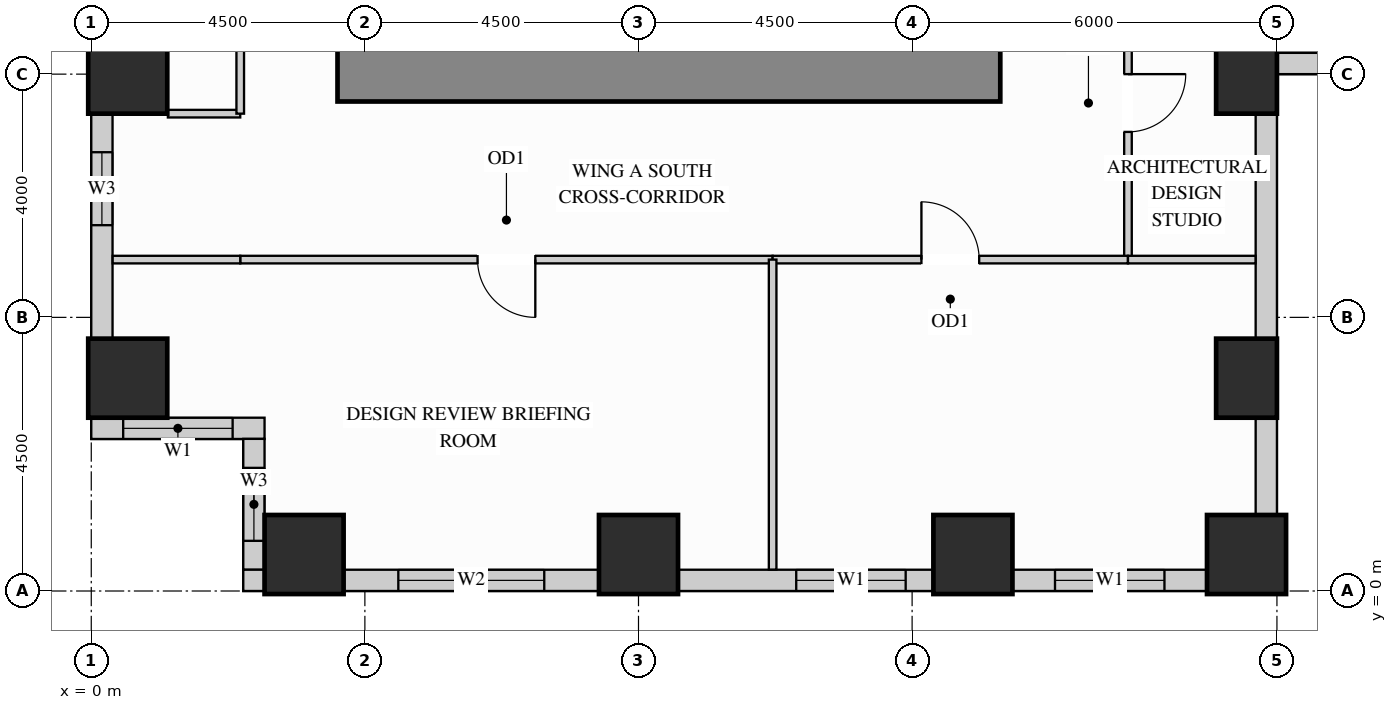
"""IFC4 building model, lengths in metres.
Left out: names, types, materials, properties, quantities, classifications, styles, units other than length and angle.
Written with IfcOpenShell. Run it as: python <this file> out.ifc"""

import sys

from ifc_helpers import new_model, si_unit, direction, frame, frame_2d, origin, origin_2d, place, context, subcontext, project, spatial, rectangle, extrude, source, transform, mapped, element, fill, save


model = new_model("IFC4")
c1 = context("Model", 3, precision=1e-05, world=origin(), true_north=direction((0.0, 1.0)))
c2 = subcontext(c1, "Body", "Model", "MODEL_VIEW")
j1 = project(units=[si_unit("LENGTHUNIT", "METRE"), si_unit("PLANEANGLEUNIT", "RADIAN")], contexts=[c1])
p1 = place(None, origin())
s1 = spatial("IfcSite", under=j1, at=p1, CompositionType="ELEMENT")
p2 = place(p1, origin())
s2 = spatial("IfcBuilding", under=s1, at=p2, CompositionType="ELEMENT")
p3 = place(p2, frame((0.0, 0.0, 47.7)))
s3 = spatial("IfcBuildingStorey", under=s2, at=p3, CompositionType="ELEMENT", Elevation=47.7)
m1 = source(origin(), c2, "Body", "SweptSolid", [
    extrude(rectangle(XDim=1.0, YDim=1.3, at=origin_2d()), origin(), (0.0, 0.0, 1.0), 3.38),
])
for number, where, z_axis, x_axis in (
    (1, (19.0, 3.5, 0.0), (0.0, 0.0, 1.0), (1.0, 0.0, 0.0)),
    (2, (19.0, 8.5, 0.0), (0.0, 0.0, 1.0), (1.0, 0.0, 0.0)),
):
    element("IfcColumn", number, at=place(p3, frame(where, z_axis=z_axis, x_axis=x_axis)), inside=s3, PredefinedType="COLUMN", context=c2, shape_type="MappedRepresentation", body=[
        mapped(m1, transform((0.0, 0.0, 0.0), x_axis=(1.0, 0.0, 0.0), y_axis=(0.0, 1.0, 0.0), z_axis=(0.0, 0.0, 1.0))),
    ])
m2 = source(origin(), c2, "Body", "SweptSolid", [
    extrude(rectangle(XDim=1.3, YDim=1.3, at=origin_2d()), origin(), (0.0, 0.0, 1.0), 3.38),
])
for number, where, z_axis, x_axis in (
    (3, (14.5, 0.6, 0.0), (0.0, 0.0, 1.0), (1.0, 0.0, 0.0)),
    (4, (19.0, 0.6, 0.0), (0.0, 0.0, 1.0), (1.0, 0.0, 0.0)),
    (5, (3.5, 0.6, 0.0), (0.0, 0.0, 1.0), (1.0, 0.0, 0.0)),
    (6, (9.0, 0.6, 0.0), (0.0, 0.0, 1.0), (1.0, 0.0, 0.0)),
    (7, (0.6, 3.5, 0.0), (0.0, 0.0, 1.0), (1.0, 0.0, 0.0)),
    (8, (0.6, 8.5, 0.0), (0.0, 0.0, 1.0), (1.0, 0.0, 0.0)),
):
    element("IfcColumn", number, at=place(p3, frame(where, z_axis=z_axis, x_axis=x_axis)), inside=s3, PredefinedType="COLUMN", context=c2, shape_type="MappedRepresentation", body=[
        mapped(m2, transform((0.0, 0.0, 0.0), x_axis=(1.0, 0.0, 0.0), y_axis=(0.0, 1.0, 0.0), z_axis=(0.0, 0.0, 1.0))),
    ])
m3 = source(origin(), c2, "Body", "SweptSolid", [
    extrude(rectangle(XDim=10.9, YDim=0.9, at=frame_2d((5.45, 0.0))), origin(), (0.0, 0.0, 1.0), 3.38),
])
p4 = place(p3, frame((4.05, 8.5, 0.0), z_axis=(0.0, 0.0, 1.0), x_axis=(1.0, 0.0, 0.0)))
e9 = element("IfcWall", 9, at=p4, inside=s3, PredefinedType="SHEAR", context=c2, shape_type="MappedRepresentation", body=[
    mapped(m3, transform((0.0, 0.0, 0.0), x_axis=(1.0, 0.0, 0.0), y_axis=(0.0, 1.0, 0.0), z_axis=(0.0, 0.0, 1.0))),
])
p5 = place(p3, frame((0.175, 7.852, 0.0), z_axis=(0.0, 0.0, 1.0), x_axis=(0.0, -1.0, 0.0)))
e10 = element("IfcWall", 10, at=p5, inside=s3, PredefinedType="SOLIDWALL", context=c2, shape_type="SweptSolid", body=[
    extrude(rectangle(XDim=3.704, YDim=0.35, at=frame_2d((1.852, 0.0))), origin(), (0.0, 0.0, 1.0), 2.51),
])
p6 = place(p5, frame((0.636, 0.0, 0.78)))
e11 = element("IfcOpeningElement", 11, at=p6, cuts=e10, PredefinedType="OPENING", context=c2, shape_type="SweptSolid", body=[
    extrude(rectangle(XDim=1.2, YDim=1.55, at=frame_2d((0.6, 0.775))), frame((0.0, 0.185, 0.0), z_axis=(0.0, -1.0, 0.0), x_axis=(1.0, 0.0, 0.0)), (0.0, 0.0, 1.0), 0.37),
])
p7 = place(p3, frame((0.0, 2.675, 0.0), z_axis=(0.0, 0.0, 1.0), x_axis=(1.0, 0.0, 0.0)))
e12 = element("IfcWall", 12, at=p7, inside=s3, PredefinedType="SOLIDWALL", context=c2, shape_type="SweptSolid", body=[
    extrude(rectangle(XDim=2.85, YDim=0.35, at=frame_2d((1.425, 0.0))), origin(), (0.0, 0.0, 1.0), 3.365),
])
p8 = place(p7, frame((0.525, 0.0, 0.78)))
e13 = element("IfcOpeningElement", 13, at=p8, cuts=e12, PredefinedType="OPENING", context=c2, shape_type="SweptSolid", body=[
    extrude(rectangle(XDim=1.8, YDim=2.1, at=frame_2d((0.9, 1.05))), frame((0.0, 0.185, 0.0), z_axis=(0.0, -1.0, 0.0), x_axis=(1.0, 0.0, 0.0)), (0.0, 0.0, 1.0), 0.37),
])
p9 = place(p3, frame((2.675, 2.502, 0.0), z_axis=(0.0, 0.0, 1.0), x_axis=(0.0, -1.0, 0.0)))
e14 = element("IfcWall", 14, at=p9, inside=s3, PredefinedType="SOLIDWALL", context=c2, shape_type="SweptSolid", body=[
    extrude(rectangle(XDim=2.154, YDim=0.35, at=frame_2d((1.077, 0.0))), origin(), (0.0, 0.0, 1.0), 3.365),
])
p10 = place(p9, frame((0.477, 0.0, 0.78)))
e15 = element("IfcOpeningElement", 15, at=p10, cuts=e14, PredefinedType="OPENING", context=c2, shape_type="SweptSolid", body=[
    extrude(rectangle(XDim=1.2, YDim=2.1, at=frame_2d((0.6, 1.05))), frame((0.0, 0.185, 0.0), z_axis=(0.0, -1.0, 0.0), x_axis=(1.0, 0.0, 0.0)), (0.0, 0.0, 1.0), 0.37),
])
m4 = source(origin(), c2, "Body", "SweptSolid", [
    extrude(rectangle(XDim=0.352, YDim=0.35, at=frame_2d((0.176, 0.0))), origin(), (0.0, 0.0, 1.0), 3.365),
])
p11 = place(p3, frame((2.5, 0.175, 0.0), z_axis=(0.0, 0.0, 1.0), x_axis=(1.0, 0.0, 0.0)))
e16 = element("IfcWall", 16, at=p11, inside=s3, PredefinedType="SOLIDWALL", context=c2, shape_type="MappedRepresentation", body=[
    mapped(m4, transform((0.0, 0.0, 0.0), x_axis=(1.0, 0.0, 0.0), y_axis=(0.0, 1.0, 0.0), z_axis=(0.0, 0.0, 1.0))),
])
p12 = place(p3, frame((4.148, 0.175, 0.0), z_axis=(0.0, 0.0, 1.0), x_axis=(1.0, 0.0, 0.0)))
e17 = element("IfcWall", 17, at=p12, inside=s3, PredefinedType="SOLIDWALL", context=c2, shape_type="SweptSolid", body=[
    extrude(rectangle(XDim=4.204, YDim=0.35, at=frame_2d((2.102, 0.0))), origin(), (0.0, 0.0, 1.0), 2.51),
])
p13 = place(p12, frame((0.902, 0.0, 0.78)))
e18 = element("IfcOpeningElement", 18, at=p13, cuts=e17, PredefinedType="OPENING", context=c2, shape_type="SweptSolid", body=[
    extrude(rectangle(XDim=2.4, YDim=1.55, at=frame_2d((1.2, 0.775))), frame((0.0, 0.185, 0.0), z_axis=(0.0, -1.0, 0.0), x_axis=(1.0, 0.0, 0.0)), (0.0, 0.0, 1.0), 0.37),
])
p14 = place(p3, frame((9.648, 0.175, 0.0), z_axis=(0.0, 0.0, 1.0), x_axis=(1.0, 0.0, 0.0)))
e19 = element("IfcWall", 19, at=p14, inside=s3, PredefinedType="SOLIDWALL", context=c2, shape_type="SweptSolid", body=[
    extrude(rectangle(XDim=4.204, YDim=0.35, at=frame_2d((2.102, 0.0))), origin(), (0.0, 0.0, 1.0), 2.51),
])
p15 = place(p14, frame((1.946, 0.0, 0.78)))
e20 = element("IfcOpeningElement", 20, at=p15, cuts=e19, PredefinedType="OPENING", context=c2, shape_type="SweptSolid", body=[
    extrude(rectangle(XDim=1.8, YDim=1.55, at=frame_2d((0.9, 0.775))), frame((0.0, 0.185, 0.0), z_axis=(0.0, -1.0, 0.0), x_axis=(1.0, 0.0, 0.0)), (0.0, 0.0, 1.0), 0.37),
])
p16 = place(p3, frame((15.148, 0.175, 0.0), z_axis=(0.0, 0.0, 1.0), x_axis=(1.0, 0.0, 0.0)))
e21 = element("IfcWall", 21, at=p16, inside=s3, PredefinedType="SOLIDWALL", context=c2, shape_type="SweptSolid", body=[
    extrude(rectangle(XDim=3.204, YDim=0.35, at=frame_2d((1.602, 0.0))), origin(), (0.0, 0.0, 1.0), 2.51),
])
p17 = place(p16, frame((0.702, 0.0, 0.78)))
e22 = element("IfcOpeningElement", 22, at=p17, cuts=e21, PredefinedType="OPENING", context=c2, shape_type="SweptSolid", body=[
    extrude(rectangle(XDim=1.8, YDim=1.55, at=frame_2d((0.9, 0.775))), frame((0.0, 0.185, 0.0), z_axis=(0.0, -1.0, 0.0), x_axis=(1.0, 0.0, 0.0)), (0.0, 0.0, 1.0), 0.37),
])
m5 = source(origin(), c2, "Body", "SweptSolid", [
    extrude(rectangle(XDim=1.604, YDim=0.35, at=frame_2d((0.802, 0.0))), origin(), (0.0, 0.0, 1.0), 2.51),
])
p18 = place(p3, frame((19.325, 1.248, 0.0), z_axis=(0.0, 0.0, 1.0), x_axis=(0.0, 1.0, 0.0)))
e23 = element("IfcWall", 23, at=p18, inside=s3, PredefinedType="SOLIDWALL", context=c2, shape_type="MappedRepresentation", body=[
    mapped(m5, transform((0.0, 0.0, 0.0), x_axis=(1.0, 0.0, 0.0), y_axis=(0.0, 1.0, 0.0), z_axis=(0.0, 0.0, 1.0))),
])
m6 = source(origin(), c2, "Body", "SweptSolid", [
    extrude(rectangle(XDim=3.704, YDim=0.35, at=frame_2d((1.852, 0.0))), origin(), (0.0, 0.0, 1.0), 2.51),
])
p19 = place(p3, frame((19.325, 4.148, 0.0), z_axis=(0.0, 0.0, 1.0), x_axis=(0.0, 1.0, 0.0)))
e24 = element("IfcWall", 24, at=p19, inside=s3, PredefinedType="SOLIDWALL", context=c2, shape_type="MappedRepresentation", body=[
    mapped(m6, transform((0.0, 0.0, 0.0), x_axis=(1.0, 0.0, 0.0), y_axis=(0.0, 1.0, 0.0), z_axis=(0.0, 0.0, 1.0))),
])
p20 = place(p3, frame((19.498, 8.675, 0.0), z_axis=(0.0, 0.0, 1.0), x_axis=(1.0, 0.0, 0.0)))
e25 = element("IfcWall", 25, at=p20, inside=s3, PredefinedType="SOLIDWALL", context=c2, shape_type="SweptSolid", body=[
    extrude(rectangle(XDim=3.404, YDim=0.35, at=frame_2d((1.702, 0.0))), origin(), (0.0, 0.0, 1.0), 3.365),
])
p21 = place(p20, frame((0.952, 0.0, 0.78)))
e26 = element("IfcOpeningElement", 26, at=p21, cuts=e25, PredefinedType="OPENING", context=c2, shape_type="SweptSolid", body=[
    extrude(rectangle(XDim=1.5, YDim=2.0, at=frame_2d((0.75, 1.0))), frame((0.0, 0.185, 0.0), z_axis=(0.0, -1.0, 0.0), x_axis=(1.0, 0.0, 0.0)), (0.0, 0.0, 1.0), 0.37),
])
p22 = place(p3, frame((17.05, 5.45, 0.0), z_axis=(0.0, 0.0, 1.0), x_axis=(0.0, 1.0, 0.0)))
e27 = element("IfcWall", 27, at=p22, inside=s3, PredefinedType="PARTITIONING", context=c2, shape_type="SweptSolid", body=[
    extrude(rectangle(XDim=5.15, YDim=0.125, at=frame_2d((2.575, 0.0))), origin(), (0.0, 0.0, 1.0), 3.365),
])
p23 = place(p22, frame((2.1, 0.0, 0.0)))
e28 = element("IfcOpeningElement", 28, at=p23, cuts=e27, PredefinedType="OPENING", context=c2, shape_type="SweptSolid", body=[
    extrude(rectangle(XDim=0.95, YDim=2.15, at=frame_2d((0.475, 1.075))), frame((0.0, 0.073, 0.0), z_axis=(0.0, -1.0, 0.0), x_axis=(1.0, 0.0, 0.0)), (0.0, 0.0, 1.0), 0.145),
])
m7 = source(origin(), c2, "Body", "SweptSolid", [
    extrude(rectangle(XDim=1.19, YDim=0.125, at=frame_2d((0.595, 0.0))), origin(), (0.0, 0.0, 1.0), 3.365),
])
p24 = place(p3, frame((1.26, 7.85, 0.0), z_axis=(0.0, 0.0, 1.0), x_axis=(1.0, 0.0, 0.0)))
e29 = element("IfcWall", 29, at=p24, inside=s3, PredefinedType="PARTITIONING", context=c2, shape_type="MappedRepresentation", body=[
    mapped(m7, transform((0.0, 0.0, 0.0), x_axis=(1.0, 0.0, 0.0), y_axis=(0.0, 1.0, 0.0), z_axis=(0.0, 0.0, 1.0))),
])
p25 = place(p3, frame((2.45, 5.45, 0.0), z_axis=(0.0, 0.0, 1.0), x_axis=(1.0, 0.0, 0.0)))
e30 = element("IfcWall", 30, at=p25, inside=s3, PredefinedType="PARTITIONING", context=c2, shape_type="SweptSolid", body=[
    extrude(rectangle(XDim=8.756, YDim=0.125, at=frame_2d((4.378, 0.0))), origin(), (0.0, 0.0, 1.0), 3.365),
])
p26 = place(p25, frame((3.903, 0.0, 0.0)))
e31 = element("IfcOpeningElement", 31, at=p26, cuts=e30, PredefinedType="OPENING", context=c2, shape_type="SweptSolid", body=[
    extrude(rectangle(XDim=0.95, YDim=2.15, at=frame_2d((0.475, 1.075))), frame((0.0, 0.073, 0.0), z_axis=(0.0, -1.0, 0.0), x_axis=(1.0, 0.0, 0.0)), (0.0, 0.0, 1.0), 0.145),
])
p27 = place(p3, frame((11.206, 5.45, 0.0), z_axis=(0.0, 0.0, 1.0), x_axis=(1.0, 0.0, 0.0)))
e32 = element("IfcWall", 32, at=p27, inside=s3, PredefinedType="PARTITIONING", context=c2, shape_type="SweptSolid", body=[
    extrude(rectangle(XDim=5.844, YDim=0.125, at=frame_2d((2.922, 0.0))), origin(), (0.0, 0.0, 1.0), 3.365),
])
p28 = place(p27, frame((2.447, 0.0, 0.0)))
e33 = element("IfcOpeningElement", 33, at=p28, cuts=e32, PredefinedType="OPENING", context=c2, shape_type="SweptSolid", body=[
    extrude(rectangle(XDim=0.95, YDim=2.15, at=frame_2d((0.475, 1.075))), frame((0.0, 0.073, 0.0), z_axis=(0.0, -1.0, 0.0), x_axis=(1.0, 0.0, 0.0)), (0.0, 0.0, 1.0), 0.145),
])
m8 = source(origin(), c2, "Body", "SweptSolid", [
    extrude(rectangle(XDim=2.098, YDim=0.125, at=frame_2d((1.049, 0.0))), origin(), (0.0, 0.0, 1.0), 3.365),
])
for number, where, z_axis, x_axis in (
    (34, (0.352, 5.45, 0.0), (0.0, 0.0, 1.0), (1.0, 0.0, 0.0)),
    (35, (17.05, 5.45, 0.0), (0.0, 0.0, 1.0), (1.0, 0.0, 0.0)),
):
    element("IfcWall", number, at=place(p3, frame(where, z_axis=z_axis, x_axis=x_axis)), inside=s3, PredefinedType="PARTITIONING", context=c2, shape_type="MappedRepresentation", body=[
        mapped(m8, transform((0.0, 0.0, 0.0), x_axis=(1.0, 0.0, 0.0), y_axis=(0.0, 1.0, 0.0), z_axis=(0.0, 0.0, 1.0))),
    ])
m9 = source(origin(), c2, "Body", "SweptSolid", [
    extrude(rectangle(XDim=5.098, YDim=0.125, at=frame_2d((2.549, 0.0))), origin(), (0.0, 0.0, 1.0), 3.365),
])
p29 = place(p3, frame((11.206, 0.352, 0.0), z_axis=(0.0, 0.0, 1.0), x_axis=(0.0, 1.0, 0.0)))
e36 = element("IfcWall", 36, at=p29, inside=s3, PredefinedType="PARTITIONING", context=c2, shape_type="MappedRepresentation", body=[
    mapped(m9, transform((0.0, 0.0, 0.0), x_axis=(1.0, 0.0, 0.0), y_axis=(0.0, 1.0, 0.0), z_axis=(0.0, 0.0, 1.0))),
])
p30 = place(p3, frame((2.45, 7.85, 0.0), z_axis=(0.0, 0.0, 1.0), x_axis=(0.0, 1.0, 0.0)))
e37 = element("IfcWall", 37, at=p30, inside=s3, PredefinedType="PARTITIONING", context=c2, shape_type="SweptSolid", body=[
    extrude(rectangle(XDim=7.25, YDim=0.125, at=frame_2d((3.625, 0.0))), origin(), (0.0, 0.0, 1.0), 3.365),
])
p31 = place(p30, frame((3.15, 0.0, 0.0)))
e38 = element("IfcOpeningElement", 38, at=p31, cuts=e37, PredefinedType="OPENING", context=c2, shape_type="SweptSolid", body=[
    extrude(rectangle(XDim=0.95, YDim=2.15, at=frame_2d((0.475, 1.075))), frame((0.0, 0.073, 0.0), z_axis=(0.0, -1.0, 0.0), x_axis=(1.0, 0.0, 0.0)), (0.0, 0.0, 1.0), 0.145),
])
m10 = source(origin(), c2, "Body", "SweptSolid", [
    extrude(rectangle(XDim=0.95, YDim=2.15, at=frame_2d((0.475, 1.075))), frame((0.0, 0.025, 0.0), z_axis=(0.0, -1.0, 0.0), x_axis=(1.0, 0.0, 0.0)), (0.0, 0.0, 1.0), 0.05),
])
p32 = place(p23, origin())
e39 = element("IfcDoor", 39, at=p32, inside=s3, OperationType="SINGLE_SWING_RIGHT", PredefinedType="DOOR", context=c2, shape_type="MappedRepresentation", body=[
    mapped(m10, transform((0.0, 0.0, 0.0), x_axis=(1.0, 0.0, 0.0), y_axis=(0.0, 1.0, 0.0), z_axis=(0.0, 0.0, 1.0))),
])
fill(e28, e39)
p33 = place(p26, origin())
e40 = element("IfcDoor", 40, at=p33, inside=s3, OperationType="SINGLE_SWING_RIGHT", PredefinedType="DOOR", context=c2, shape_type="MappedRepresentation", body=[
    mapped(m10, transform((0.0, 0.0, 0.0), x_axis=(1.0, 0.0, 0.0), y_axis=(0.0, 1.0, 0.0), z_axis=(0.0, 0.0, 1.0))),
])
fill(e31, e40)
p34 = place(p28, origin())
e41 = element("IfcDoor", 41, at=p34, inside=s3, OperationType="SINGLE_SWING_LEFT", PredefinedType="DOOR", context=c2, shape_type="MappedRepresentation", body=[
    mapped(m10, transform((0.0, 0.0, 0.0), x_axis=(1.0, 0.0, 0.0), y_axis=(0.0, 1.0, 0.0), z_axis=(0.0, 0.0, 1.0))),
])
fill(e33, e41)
m11 = source(origin(), c2, "Body", "SweptSolid", [
    extrude(rectangle(XDim=1.8, YDim=2.1, at=frame_2d((0.9, 1.05))), frame((0.0, 0.03, 0.0), z_axis=(0.0, -1.0, 0.0), x_axis=(1.0, 0.0, 0.0)), (0.0, 0.0, 1.0), 0.06),
])
p35 = place(p8, origin())
e42 = element("IfcWindow", 42, at=p35, inside=s3, PartitioningType="SINGLE_PANEL", PredefinedType="WINDOW", context=c2, shape_type="MappedRepresentation", body=[
    mapped(m11, transform((0.0, 0.0, 0.0), x_axis=(1.0, 0.0, 0.0), y_axis=(0.0, 1.0, 0.0), z_axis=(0.0, 0.0, 1.0))),
])
fill(e13, e42)
m12 = source(origin(), c2, "Body", "SweptSolid", [
    extrude(rectangle(XDim=1.8, YDim=1.55, at=frame_2d((0.9, 0.775))), frame((0.0, 0.03, 0.0), z_axis=(0.0, -1.0, 0.0), x_axis=(1.0, 0.0, 0.0)), (0.0, 0.0, 1.0), 0.06),
])
p36 = place(p15, origin())
e43 = element("IfcWindow", 43, at=p36, inside=s3, PartitioningType="SINGLE_PANEL", PredefinedType="WINDOW", context=c2, shape_type="MappedRepresentation", body=[
    mapped(m12, transform((0.0, 0.0, 0.0), x_axis=(1.0, 0.0, 0.0), y_axis=(0.0, 1.0, 0.0), z_axis=(0.0, 0.0, 1.0))),
])
fill(e20, e43)
p37 = place(p17, origin())
e44 = element("IfcWindow", 44, at=p37, inside=s3, PartitioningType="SINGLE_PANEL", PredefinedType="WINDOW", context=c2, shape_type="MappedRepresentation", body=[
    mapped(m12, transform((0.0, 0.0, 0.0), x_axis=(1.0, 0.0, 0.0), y_axis=(0.0, 1.0, 0.0), z_axis=(0.0, 0.0, 1.0))),
])
fill(e22, e44)
m13 = source(origin(), c2, "Body", "SweptSolid", [
    extrude(rectangle(XDim=2.4, YDim=1.55, at=frame_2d((1.2, 0.775))), frame((0.0, 0.03, 0.0), z_axis=(0.0, -1.0, 0.0), x_axis=(1.0, 0.0, 0.0)), (0.0, 0.0, 1.0), 0.06),
])
p38 = place(p13, origin())
e45 = element("IfcWindow", 45, at=p38, inside=s3, PartitioningType="SINGLE_PANEL", PredefinedType="WINDOW", context=c2, shape_type="MappedRepresentation", body=[
    mapped(m13, transform((0.0, 0.0, 0.0), x_axis=(1.0, 0.0, 0.0), y_axis=(0.0, 1.0, 0.0), z_axis=(0.0, 0.0, 1.0))),
])
fill(e18, e45)
m14 = source(origin(), c2, "Body", "SweptSolid", [
    extrude(rectangle(XDim=1.2, YDim=1.55, at=frame_2d((0.6, 0.775))), frame((0.0, 0.03, 0.0), z_axis=(0.0, -1.0, 0.0), x_axis=(1.0, 0.0, 0.0)), (0.0, 0.0, 1.0), 0.06),
])
p39 = place(p6, origin())
e46 = element("IfcWindow", 46, at=p39, inside=s3, PartitioningType="SINGLE_PANEL", PredefinedType="WINDOW", context=c2, shape_type="MappedRepresentation", body=[
    mapped(m14, transform((0.0, 0.0, 0.0), x_axis=(1.0, 0.0, 0.0), y_axis=(0.0, 1.0, 0.0), z_axis=(0.0, 0.0, 1.0))),
])
fill(e11, e46)
m15 = source(origin(), c2, "Body", "SweptSolid", [
    extrude(rectangle(XDim=1.2, YDim=2.1, at=frame_2d((0.6, 1.05))), frame((0.0, 0.03, 0.0), z_axis=(0.0, -1.0, 0.0), x_axis=(1.0, 0.0, 0.0)), (0.0, 0.0, 1.0), 0.06),
])
p40 = place(p10, origin())
e47 = element("IfcWindow", 47, at=p40, inside=s3, PartitioningType="SINGLE_PANEL", PredefinedType="WINDOW", context=c2, shape_type="MappedRepresentation", body=[
    mapped(m15, transform((0.0, 0.0, 0.0), x_axis=(1.0, 0.0, 0.0), y_axis=(0.0, 1.0, 0.0), z_axis=(0.0, 0.0, 1.0))),
])
fill(e15, e47)
save(model, sys.argv[1])
